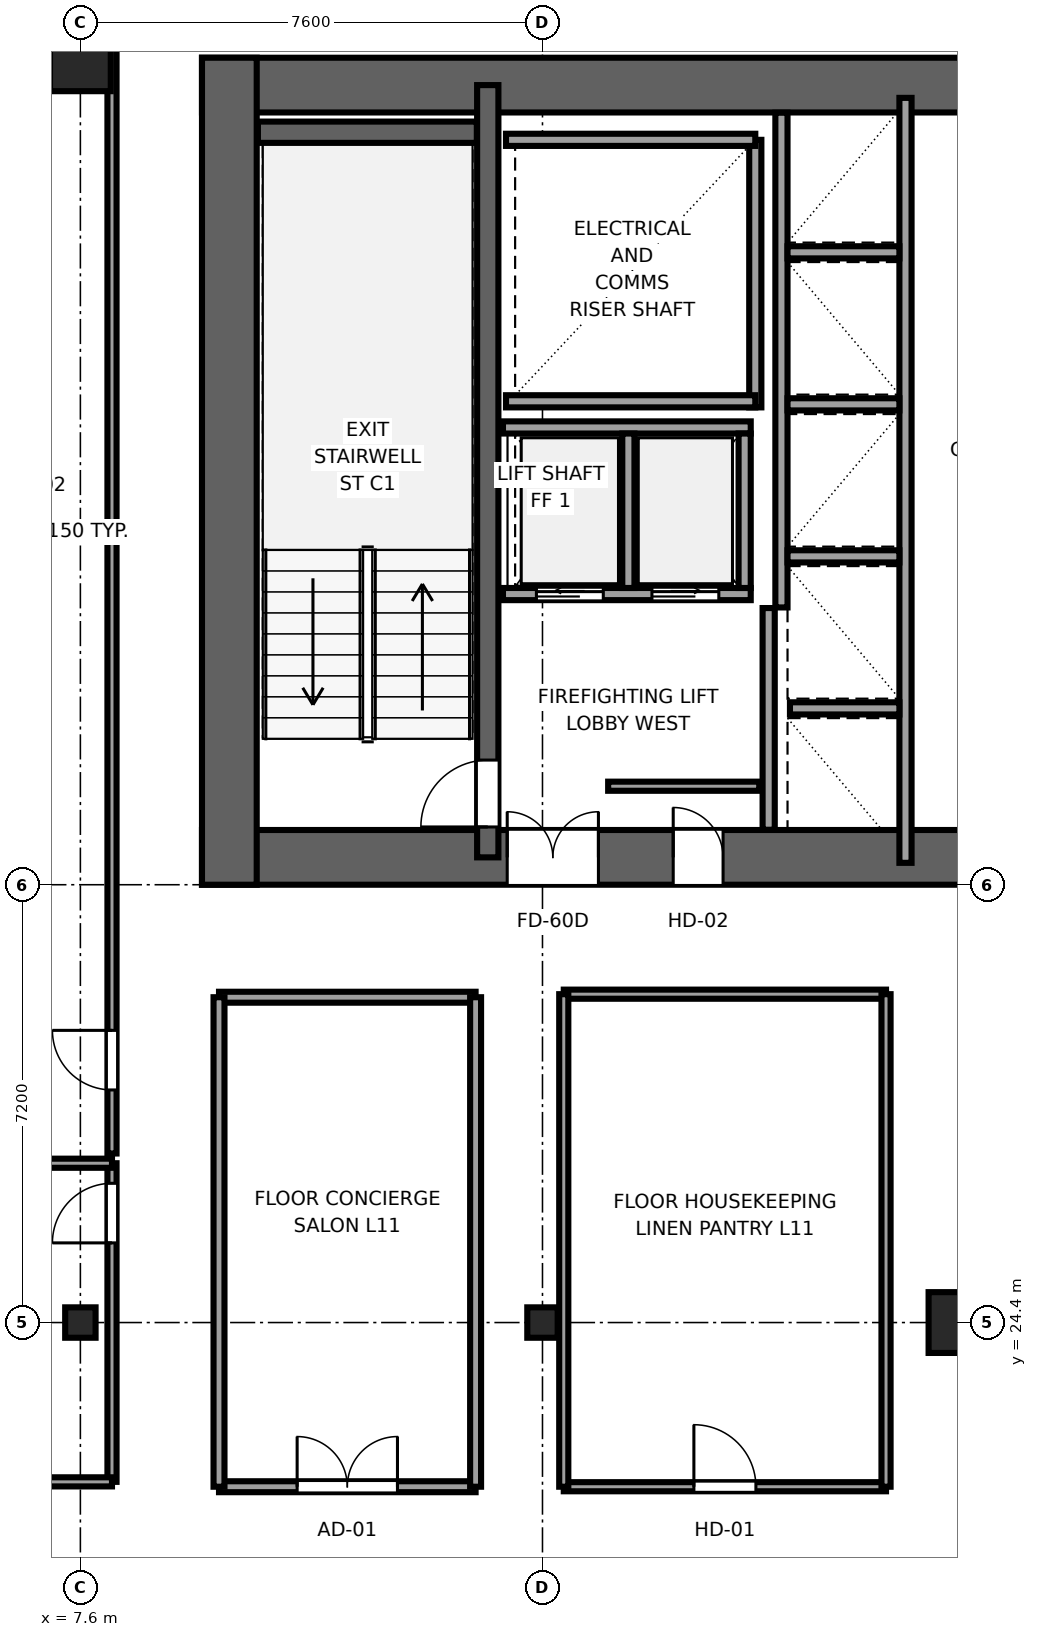
"""IFC4 building model, lengths in metres.
Left out: names, types, materials, properties, quantities, classifications, styles, units other than length and angle.
Written with IfcOpenShell. Run it as: python <this file> out.ifc"""

import sys

from ifc_helpers import new_model, si_unit, direction, frame, frame_2d, origin, origin_2d, place, context, subcontext, project, spatial, rectangle, i_section, extrude, source, transform, mapped, element, fill, save


model = new_model("IFC4")
c1 = context("Model", 3, precision=1e-05, world=origin(), true_north=direction((0.0, 1.0)))
c2 = subcontext(c1, "Body", "Model", "MODEL_VIEW")
j1 = project(units=[si_unit("LENGTHUNIT", "METRE"), si_unit("PLANEANGLEUNIT", "RADIAN")], contexts=[c1])
p1 = place(None, origin())
s1 = spatial("IfcSite", under=j1, at=p1, CompositionType="ELEMENT")
p2 = place(p1, origin())
s2 = spatial("IfcBuilding", under=s1, at=p2, CompositionType="ELEMENT")
p3 = place(p2, frame((0.0, 0.0, 49.75)))
s3 = spatial("IfcBuildingStorey", under=s2, at=p3, CompositionType="ELEMENT", Elevation=49.75)
p4 = place(p3, frame((9.6, 32.05, 0.0), z_axis=(0.0, 0.0, 1.0), x_axis=(1.0, 0.0, 0.0)))
e1 = element("IfcWall", 1, at=p4, inside=s3, PredefinedType="SHEAR", context=c2, shape_type="SweptSolid", body=[
    extrude(rectangle(XDim=26.8, YDim=0.9, at=frame_2d((13.4, 0.0))), origin(), (0.0, 0.0, 1.0), 3.55),
])
p5 = place(p4, frame((6.52, 0.0, 0.0), z_axis=(0.0, 0.0, 1.0), x_axis=(-1.0, 0.0, 0.0)))
e2 = element("IfcOpeningElement", 2, at=p5, cuts=e1, PredefinedType="OPENING", context=c2, shape_type="SweptSolid", body=[
    extrude(rectangle(XDim=1.5, YDim=2.04, at=frame_2d((0.75, 1.02))), frame((0.0, 0.46, 0.0), z_axis=(0.0, -1.0, 0.0), x_axis=(1.0, 0.0, 0.0)), (0.0, 0.0, 1.0), 0.92),
])
p6 = place(p4, frame((14.15, 0.0, 0.0), z_axis=(0.0, 0.0, 1.0), x_axis=(-1.0, 0.0, 0.0)))
e3 = element("IfcOpeningElement", 3, at=p6, cuts=e1, PredefinedType="OPENING", context=c2, shape_type="SweptSolid", body=[
    extrude(rectangle(XDim=1.5, YDim=2.04, at=frame_2d((0.75, 1.02))), frame((0.0, 0.46, 0.0), z_axis=(0.0, -1.0, 0.0), x_axis=(1.0, 0.0, 0.0)), (0.0, 0.0, 1.0), 0.92),
])
p7 = place(p4, frame((21.78, 0.0, 0.0), z_axis=(0.0, 0.0, 1.0), x_axis=(-1.0, 0.0, 0.0)))
e4 = element("IfcOpeningElement", 4, at=p7, cuts=e1, PredefinedType="OPENING", context=c2, shape_type="SweptSolid", body=[
    extrude(rectangle(XDim=1.5, YDim=2.04, at=frame_2d((0.75, 1.02))), frame((0.0, 0.46, 0.0), z_axis=(0.0, -1.0, 0.0), x_axis=(1.0, 0.0, 0.0)), (0.0, 0.0, 1.0), 0.92),
])
p8 = place(p4, frame((8.57, 0.0, 0.0), z_axis=(0.0, 0.0, 1.0), x_axis=(-1.0, 0.0, 0.0)))
e5 = element("IfcOpeningElement", 5, at=p8, cuts=e1, PredefinedType="OPENING", context=c2, shape_type="SweptSolid", body=[
    extrude(rectangle(XDim=0.82, YDim=2.01, at=frame_2d((0.41, 1.005))), frame((0.0, 0.46, 0.0), z_axis=(0.0, -1.0, 0.0), x_axis=(1.0, 0.0, 0.0)), (0.0, 0.0, 1.0), 0.92),
])
p9 = place(p4, frame((19.07, 0.0, 0.0), z_axis=(0.0, 0.0, 1.0), x_axis=(-1.0, 0.0, 0.0)))
e6 = element("IfcOpeningElement", 6, at=p9, cuts=e1, PredefinedType="OPENING", context=c2, shape_type="SweptSolid", body=[
    extrude(rectangle(XDim=0.82, YDim=2.01, at=frame_2d((0.41, 1.005))), frame((0.0, 0.46, 0.0), z_axis=(0.0, -1.0, 0.0), x_axis=(1.0, 0.0, 0.0)), (0.0, 0.0, 1.0), 0.92),
])
p10 = place(p3, frame((9.6, 44.75, 0.0), z_axis=(0.0, 0.0, 1.0), x_axis=(1.0, 0.0, 0.0)))
e7 = element("IfcWall", 7, at=p10, inside=s3, PredefinedType="SHEAR", context=c2, shape_type="SweptSolid", body=[
    extrude(rectangle(XDim=26.8, YDim=0.9, at=frame_2d((13.4, 0.0))), origin(), (0.0, 0.0, 1.0), 3.55),
])
p11 = place(p3, frame((10.05, 31.6, 0.0), z_axis=(0.0, 0.0, 1.0), x_axis=(0.0, 1.0, 0.0)))
e8 = element("IfcWall", 8, at=p11, inside=s3, PredefinedType="SHEAR", context=c2, shape_type="SweptSolid", body=[
    extrude(rectangle(XDim=13.6, YDim=0.9, at=frame_2d((6.8, 0.0))), origin(), (0.0, 0.0, 1.0), 3.55),
])
p12 = place(p3, frame((14.3, 32.05, 0.0), z_axis=(0.0, 0.0, 1.0), x_axis=(0.0, 1.0, 0.0)))
e9 = element("IfcWall", 9, at=p12, inside=s3, PredefinedType="SHEAR", context=c2, shape_type="SweptSolid", body=[
    extrude(rectangle(XDim=12.7, YDim=0.35, at=frame_2d((6.35, 0.0))), origin(), (0.0, 0.0, 1.0), 3.55),
])
p13 = place(p12, frame((0.5, 0.0, 0.0)))
e10 = element("IfcOpeningElement", 10, at=p13, cuts=e9, PredefinedType="OPENING", context=c2, shape_type="SweptSolid", body=[
    extrude(rectangle(XDim=1.1, YDim=2.12, at=frame_2d((0.55, 1.06))), frame((0.0, 0.185, 0.0), z_axis=(0.0, -1.0, 0.0), x_axis=(1.0, 0.0, 0.0)), (0.0, 0.0, 1.0), 0.37),
])
p14 = place(p3, frame((10.52, 43.975, 0.0), z_axis=(0.0, 0.0, 1.0), x_axis=(1.0, 0.0, 0.0)))
e11 = element("IfcWall", 11, at=p14, inside=s3, PredefinedType="SHEAR", context=c2, shape_type="SweptSolid", body=[
    extrude(rectangle(XDim=3.6, YDim=0.35, at=frame_2d((1.8, 0.0))), origin(), (0.0, 0.0, 1.0), 3.55),
])
m1 = source(origin(), c2, "Body", "SweptSolid", [
    extrude(i_section(OverallWidth=0.5, OverallDepth=0.5, WebThickness=0.028, FlangeThickness=0.045, at=origin_2d()), origin(), (0.0, 0.0, 1.0), 3.55),
])
for number, where, z_axis, x_axis in (
    (12, (7.6, 24.4, 0.0), (0.0, 0.0, 1.0), (1.0, 0.0, 0.0)),
    (13, (15.2, 24.4, 0.0), (0.0, 0.0, 1.0), (1.0, 0.0, 0.0)),
):
    element("IfcColumn", number, at=place(p3, frame(where, z_axis=z_axis, x_axis=x_axis)), inside=s3, PredefinedType="COLUMN", context=c2, shape_type="MappedRepresentation", body=[
        mapped(m1, transform((0.0, 0.0, 0.0), x_axis=(1.0, 0.0, 0.0), y_axis=(0.0, 1.0, 0.0), z_axis=(0.0, 0.0, 1.0), scale=1.0)),
    ])
m2 = source(origin(), c2, "Body", "SweptSolid", [
    extrude(rectangle(XDim=1.0, YDim=1.0, at=origin_2d()), origin(), (0.0, 0.0, 1.0), 3.55),
])
for number, where, z_axis, x_axis in (
    (14, (22.05, 24.4, 0.0), (0.0, 0.0, 1.0), (1.0, 0.0, 0.0)),
    (15, (7.6, 45.15, 0.0), (0.0, 0.0, 1.0), (1.0, 0.0, 0.0)),
):
    element("IfcColumn", number, at=place(p3, frame(where, z_axis=z_axis, x_axis=x_axis)), inside=s3, PredefinedType="COLUMN", context=c2, shape_type="MappedRepresentation", body=[
        mapped(m2, transform((0.0, 0.0, 0.0), x_axis=(1.0, 0.0, 0.0), y_axis=(0.0, 1.0, 0.0), z_axis=(0.0, 0.0, 1.0), scale=1.0)),
    ])
p15 = place(p3, frame((18.7, 39.45, 0.0), z_axis=(0.0, 0.0, 1.0), x_axis=(0.0, 1.0, 0.0)))
e16 = element("IfcWall", 16, at=p15, inside=s3, PredefinedType="SOLIDWALL", context=c2, shape_type="SweptSolid", body=[
    extrude(rectangle(XDim=4.4, YDim=0.2, at=frame_2d((2.2, 0.0))), origin(), (0.0, 0.0, 1.0), 3.37),
])
for number, where, z_axis, x_axis in (
    (17, (14.6, 39.55, 0.0), (0.0, 0.0, 1.0), (1.0, 0.0, 0.0)),
    (18, (14.6, 43.85, 0.0), (0.0, 0.0, 1.0), (1.0, 0.0, 0.0)),
):
    element("IfcWall", number, at=place(p3, frame(where, z_axis=z_axis, x_axis=x_axis)), inside=s3, PredefinedType="SOLIDWALL", context=c2, shape_type="SweptSolid", body=[
        extrude(rectangle(XDim=4.1, YDim=0.2, at=frame_2d((2.05, 0.0))), origin(), (0.0, 0.0, 1.0), 3.37),
    ])
p16 = place(p3, frame((18.92, 32.504, 0.0), z_axis=(0.0, 0.0, 1.0), x_axis=(0.0, 1.0, 0.0)))
e19 = element("IfcWall", 19, at=p16, inside=s3, PredefinedType="SOLIDWALL", context=c2, shape_type="SweptSolid", body=[
    extrude(rectangle(XDim=3.646, YDim=0.2, at=frame_2d((1.823, 0.0))), origin(), (0.0, 0.0, 1.0), 3.37),
])
p17 = place(p3, frame((21.17, 31.96, 0.0), z_axis=(0.0, 0.0, 1.0), x_axis=(0.0, 1.0, 0.0)))
e20 = element("IfcWall", 20, at=p17, inside=s3, PredefinedType="SOLIDWALL", context=c2, shape_type="SweptSolid", body=[
    extrude(rectangle(XDim=12.58, YDim=0.2, at=frame_2d((6.29, 0.0))), origin(), (0.0, 0.0, 1.0), 3.37),
])
p18 = place(p3, frame((19.13, 36.16, 0.0), z_axis=(0.0, 0.0, 1.0), x_axis=(0.0, 1.0, 0.0)))
e21 = element("IfcWall", 21, at=p18, inside=s3, PredefinedType="SOLIDWALL", context=c2, shape_type="SweptSolid", body=[
    extrude(rectangle(XDim=8.136, YDim=0.2, at=frame_2d((4.068, 0.0))), origin(), (0.0, 0.0, 1.0), 3.37),
])
p19 = place(p3, frame((19.27, 34.5, 0.0), z_axis=(0.0, 0.0, 1.0), x_axis=(1.0, 0.0, 0.0)))
e22 = element("IfcWall", 22, at=p19, inside=s3, PredefinedType="SOLIDWALL", context=c2, shape_type="SweptSolid", body=[
    extrude(rectangle(XDim=1.8, YDim=0.2, at=frame_2d((0.9, 0.0))), origin(), (0.0, 0.0, 1.0), 3.37),
])
for number, where, z_axis, x_axis in (
    (23, (19.23, 37.0, 0.0), (0.0, 0.0, 1.0), (1.0, 0.0, 0.0)),
    (24, (19.23, 39.5, 0.0), (0.0, 0.0, 1.0), (1.0, 0.0, 0.0)),
    (25, (19.23, 42.0, 0.0), (0.0, 0.0, 1.0), (1.0, 0.0, 0.0)),
):
    element("IfcWall", number, at=place(p3, frame(where, z_axis=z_axis, x_axis=x_axis)), inside=s3, PredefinedType="SOLIDWALL", context=c2, shape_type="SweptSolid", body=[
        extrude(rectangle(XDim=1.84, YDim=0.2, at=frame_2d((0.92, 0.0))), origin(), (0.0, 0.0, 1.0), 3.37),
    ])
p20 = place(p3, frame((14.55, 36.38, 0.0), z_axis=(0.0, 0.0, 1.0), x_axis=(1.0, 0.0, 0.0)))
e26 = element("IfcWall", 26, at=p20, inside=s3, PredefinedType="SOLIDWALL", context=c2, shape_type="SweptSolid", body=[
    extrude(rectangle(XDim=4.075, YDim=0.2, at=frame_2d((2.038, 0.0))), origin(), (0.0, 0.0, 1.0), 3.37),
])
p21 = place(p20, frame((0.55, 0.0, 0.0)))
e27 = element("IfcOpeningElement", 27, at=p21, cuts=e26, PredefinedType="OPENING", context=c2, shape_type="SweptSolid", body=[
    extrude(rectangle(XDim=1.1, YDim=2.12, at=frame_2d((0.55, 1.06))), frame((0.0, 0.11, 0.0), z_axis=(0.0, -1.0, 0.0), x_axis=(1.0, 0.0, 0.0)), (0.0, 0.0, 1.0), 0.22),
])
p22 = place(p20, frame((2.45, 0.0, 0.0)))
e28 = element("IfcOpeningElement", 28, at=p22, cuts=e26, PredefinedType="OPENING", context=c2, shape_type="SweptSolid", body=[
    extrude(rectangle(XDim=1.1, YDim=2.12, at=frame_2d((0.55, 1.06))), frame((0.0, 0.11, 0.0), z_axis=(0.0, -1.0, 0.0), x_axis=(1.0, 0.0, 0.0)), (0.0, 0.0, 1.0), 0.22),
])
p23 = place(p3, frame((14.55, 39.12, 0.0), z_axis=(0.0, 0.0, 1.0), x_axis=(1.0, 0.0, 0.0)))
e29 = element("IfcWall", 29, at=p23, inside=s3, PredefinedType="SOLIDWALL", context=c2, shape_type="SweptSolid", body=[
    extrude(rectangle(XDim=4.075, YDim=0.2, at=frame_2d((2.038, 0.0))), origin(), (0.0, 0.0, 1.0), 3.37),
])
for number, where, z_axis, x_axis in (
    (30, (18.525, 36.48, 0.0), (0.0, 0.0, 1.0), (0.0, 1.0, 0.0)),
    (31, (16.613, 36.48, 0.0), (0.0, 0.0, 1.0), (0.0, 1.0, 0.0)),
):
    element("IfcWall", number, at=place(p3, frame(where, z_axis=z_axis, x_axis=x_axis)), inside=s3, PredefinedType="SOLIDWALL", context=c2, shape_type="SweptSolid", body=[
        extrude(rectangle(XDim=2.54, YDim=0.2, at=frame_2d((1.27, 0.0))), origin(), (0.0, 0.0, 1.0), 3.37),
    ])
p24 = place(p3, frame((16.28, 33.22, 0.0), z_axis=(0.0, 0.0, 1.0), x_axis=(1.0, 0.0, 0.0)))
e32 = element("IfcWall", 32, at=p24, inside=s3, PredefinedType="PARTITIONING", context=c2, shape_type="SweptSolid", body=[
    extrude(rectangle(XDim=2.485, YDim=0.15, at=frame_2d((1.242, 0.0))), origin(), (0.0, 0.0, 1.0), 3.37),
])
p25 = place(p3, frame((8.12, 21.78, 0.0), z_axis=(0.0, 0.0, 1.0), x_axis=(0.0, 1.0, 0.0)))
e33 = element("IfcWall", 33, at=p25, inside=s3, PredefinedType="PARTITIONING", context=c2, shape_type="SweptSolid", body=[
    extrude(rectangle(XDim=5.24, YDim=0.15, at=frame_2d((2.62, 0.0))), origin(), (0.0, 0.0, 1.0), 3.37),
])
p26 = place(p25, frame((3.93, 0.0, 0.0)))
e34 = element("IfcOpeningElement", 34, at=p26, cuts=e33, PredefinedType="OPENING", context=c2, shape_type="SweptSolid", body=[
    extrude(rectangle(XDim=0.98, YDim=2.12, at=frame_2d((0.49, 1.06))), frame((0.0, 0.085, 0.0), z_axis=(0.0, -1.0, 0.0), x_axis=(1.0, 0.0, 0.0)), (0.0, 0.0, 1.0), 0.17),
])
p27 = place(p3, frame((0.405, 21.78, 0.0), z_axis=(0.0, 0.0, 1.0), x_axis=(1.0, 0.0, 0.0)))
e35 = element("IfcWall", 35, at=p27, inside=s3, PredefinedType="PARTITIONING", context=c2, shape_type="SweptSolid", body=[
    extrude(rectangle(XDim=7.715, YDim=0.15, at=frame_2d((3.857, 0.0))), origin(), (0.0, 0.0, 1.0), 3.37),
])
p28 = place(p3, frame((2.77, 27.02, 0.0), z_axis=(0.0, 0.0, 1.0), x_axis=(1.0, 0.0, 0.0)))
e36 = element("IfcWall", 36, at=p28, inside=s3, PredefinedType="PARTITIONING", context=c2, shape_type="SweptSolid", body=[
    extrude(rectangle(XDim=5.35, YDim=0.15, at=frame_2d((2.675, 0.0))), origin(), (0.0, 0.0, 1.0), 3.37),
])
p29 = place(p3, frame((8.12, 27.18, 0.0), z_axis=(0.0, 0.0, 1.0), x_axis=(0.0, 1.0, 0.0)))
e37 = element("IfcWall", 37, at=p29, inside=s3, PredefinedType="PARTITIONING", context=c2, shape_type="SweptSolid", body=[
    extrude(rectangle(XDim=18.415, YDim=0.15, at=frame_2d((9.208, 0.0))), origin(), (0.0, 0.0, 1.0), 3.37),
])
p30 = place(p29, frame((1.045, 0.0, 0.0)))
e38 = element("IfcOpeningElement", 38, at=p30, cuts=e37, PredefinedType="OPENING", context=c2, shape_type="SweptSolid", body=[
    extrude(rectangle(XDim=0.98, YDim=2.12, at=frame_2d((0.49, 1.06))), frame((0.0, 0.085, 0.0), z_axis=(0.0, -1.0, 0.0), x_axis=(1.0, 0.0, 0.0)), (0.0, 0.0, 1.0), 0.17),
])
p31 = place(p3, frame((9.88, 21.7, 0.0), z_axis=(0.0, 0.0, 1.0), x_axis=(1.0, 0.0, 0.0)))
e39 = element("IfcWall", 39, at=p31, inside=s3, PredefinedType="PARTITIONING", context=c2, shape_type="SweptSolid", body=[
    extrude(rectangle(XDim=4.22, YDim=0.18, at=frame_2d((2.11, 0.0))), origin(), (0.0, 0.0, 1.0), 3.37),
])
p32 = place(p31, frame((1.285, 0.0, 0.0)))
e40 = element("IfcOpeningElement", 40, at=p32, cuts=e39, PredefinedType="OPENING", context=c2, shape_type="SweptSolid", body=[
    extrude(rectangle(XDim=1.65, YDim=2.15, at=frame_2d((0.825, 1.075))), frame((0.0, 0.1, 0.0), z_axis=(0.0, -1.0, 0.0), x_axis=(1.0, 0.0, 0.0)), (0.0, 0.0, 1.0), 0.2),
])
p33 = place(p3, frame((9.88, 29.75, 0.0), z_axis=(0.0, 0.0, 1.0), x_axis=(1.0, 0.0, 0.0)))
e41 = element("IfcWall", 41, at=p33, inside=s3, PredefinedType="PARTITIONING", context=c2, shape_type="SweptSolid", body=[
    extrude(rectangle(XDim=4.22, YDim=0.18, at=frame_2d((2.11, 0.0))), origin(), (0.0, 0.0, 1.0), 3.37),
])
for number, where, z_axis, x_axis in (
    (42, (9.88, 21.7, 0.0), (0.0, 0.0, 1.0), (0.0, 1.0, 0.0)),
    (43, (14.1, 21.7, 0.0), (0.0, 0.0, 1.0), (0.0, 1.0, 0.0)),
):
    element("IfcWall", number, at=place(p3, frame(where, z_axis=z_axis, x_axis=x_axis)), inside=s3, PredefinedType="PARTITIONING", context=c2, shape_type="SweptSolid", body=[
        extrude(rectangle(XDim=8.05, YDim=0.18, at=frame_2d((4.025, 0.0))), origin(), (0.0, 0.0, 1.0), 3.37),
    ])
p34 = place(p3, frame((15.55, 21.7, 0.0), z_axis=(0.0, 0.0, 1.0), x_axis=(1.0, 0.0, 0.0)))
e44 = element("IfcWall", 44, at=p34, inside=s3, PredefinedType="PARTITIONING", context=c2, shape_type="SweptSolid", body=[
    extrude(rectangle(XDim=5.3, YDim=0.15, at=frame_2d((2.65, 0.0))), origin(), (0.0, 0.0, 1.0), 3.37),
])
p35 = place(p34, frame((2.14, 0.0, 0.0)))
e45 = element("IfcOpeningElement", 45, at=p35, cuts=e44, PredefinedType="OPENING", context=c2, shape_type="SweptSolid", body=[
    extrude(rectangle(XDim=1.02, YDim=2.03, at=frame_2d((0.51, 1.015))), frame((0.0, 0.085, 0.0), z_axis=(0.0, -1.0, 0.0), x_axis=(1.0, 0.0, 0.0)), (0.0, 0.0, 1.0), 0.17),
])
p36 = place(p3, frame((15.55, 29.8, 0.0), z_axis=(0.0, 0.0, 1.0), x_axis=(1.0, 0.0, 0.0)))
e46 = element("IfcWall", 46, at=p36, inside=s3, PredefinedType="PARTITIONING", context=c2, shape_type="SweptSolid", body=[
    extrude(rectangle(XDim=5.3, YDim=0.15, at=frame_2d((2.65, 0.0))), origin(), (0.0, 0.0, 1.0), 3.37),
])
for number, where, z_axis, x_axis in (
    (47, (15.55, 21.7, 0.0), (0.0, 0.0, 1.0), (0.0, 1.0, 0.0)),
    (48, (20.85, 21.7, 0.0), (0.0, 0.0, 1.0), (0.0, 1.0, 0.0)),
):
    element("IfcWall", number, at=place(p3, frame(where, z_axis=z_axis, x_axis=x_axis)), inside=s3, PredefinedType="PARTITIONING", context=c2, shape_type="SweptSolid", body=[
        extrude(rectangle(XDim=8.1, YDim=0.15, at=frame_2d((4.05, 0.0))), origin(), (0.0, 0.0, 1.0), 3.37),
    ])
m3 = source(origin(), c2, "Body", "SweptSolid", [
    extrude(rectangle(XDim=1.1, YDim=2.12, at=frame_2d((0.55, 1.06))), frame((0.0, 0.025, 0.0), z_axis=(0.0, -1.0, 0.0), x_axis=(1.0, 0.0, 0.0)), (0.0, 0.0, 1.0), 0.05),
])
p37 = place(p13, origin())
e49 = element("IfcDoor", 49, at=p37, inside=s3, OperationType="SINGLE_SWING_LEFT", PredefinedType="DOOR", context=c2, shape_type="MappedRepresentation", body=[
    mapped(m3, transform((0.0, 0.0, 0.0), x_axis=(1.0, 0.0, 0.0), y_axis=(0.0, 1.0, 0.0), z_axis=(0.0, 0.0, 1.0), scale=1.0)),
])
fill(e10, e49)
m4 = source(origin(), c2, "Body", "SweptSolid", [
    extrude(rectangle(XDim=1.5, YDim=2.04, at=frame_2d((0.75, 1.02))), frame((0.0, 0.025, 0.0), z_axis=(0.0, -1.0, 0.0), x_axis=(1.0, 0.0, 0.0)), (0.0, 0.0, 1.0), 0.05),
])
p38 = place(p5, origin())
e50 = element("IfcDoor", 50, at=p38, inside=s3, OperationType="DOUBLE_DOOR_SINGLE_SWING", PredefinedType="DOOR", context=c2, shape_type="MappedRepresentation", body=[
    mapped(m4, transform((0.0, 0.0, 0.0), x_axis=(1.0, 0.0, 0.0), y_axis=(0.0, 1.0, 0.0), z_axis=(0.0, 0.0, 1.0), scale=1.0)),
])
fill(e2, e50)
m5 = source(origin(), c2, "Body", "SweptSolid", [
    extrude(rectangle(XDim=0.82, YDim=2.01, at=frame_2d((0.41, 1.005))), frame((0.0, 0.025, 0.0), z_axis=(0.0, -1.0, 0.0), x_axis=(1.0, 0.0, 0.0)), (0.0, 0.0, 1.0), 0.05),
])
p39 = place(p8, origin())
e51 = element("IfcDoor", 51, at=p39, inside=s3, OperationType="SINGLE_SWING_LEFT", PredefinedType="DOOR", context=c2, shape_type="MappedRepresentation", body=[
    mapped(m5, transform((0.0, 0.0, 0.0), x_axis=(1.0, 0.0, 0.0), y_axis=(0.0, 1.0, 0.0), z_axis=(0.0, 0.0, 1.0), scale=1.0)),
])
fill(e5, e51)
m6 = source(origin(), c2, "Body", "SweptSolid", [
    extrude(rectangle(XDim=1.1, YDim=2.12, at=frame_2d((0.55, 1.06))), frame((0.0, 0.025, 0.0), z_axis=(0.0, -1.0, 0.0), x_axis=(1.0, 0.0, 0.0)), (0.0, 0.0, 1.0), 0.05),
])
p40 = place(p21, origin())
e52 = element("IfcDoor", 52, at=p40, inside=s3, OperationType="SLIDING_TO_LEFT", PredefinedType="DOOR", context=c2, shape_type="MappedRepresentation", body=[
    mapped(m6, transform((0.0, 0.0, 0.0), x_axis=(1.0, 0.0, 0.0), y_axis=(0.0, 1.0, 0.0), z_axis=(0.0, 0.0, 1.0), scale=1.0)),
])
fill(e27, e52)
p41 = place(p22, origin())
e53 = element("IfcDoor", 53, at=p41, inside=s3, OperationType="SLIDING_TO_RIGHT", PredefinedType="DOOR", context=c2, shape_type="MappedRepresentation", body=[
    mapped(m6, transform((0.0, 0.0, 0.0), x_axis=(1.0, 0.0, 0.0), y_axis=(0.0, 1.0, 0.0), z_axis=(0.0, 0.0, 1.0), scale=1.0)),
])
fill(e28, e53)
m7 = source(origin(), c2, "Body", "SweptSolid", [
    extrude(rectangle(XDim=0.98, YDim=2.12, at=frame_2d((0.49, 1.06))), frame((0.0, 0.025, 0.0), z_axis=(0.0, -1.0, 0.0), x_axis=(1.0, 0.0, 0.0)), (0.0, 0.0, 1.0), 0.05),
])
p42 = place(p26, origin())
e54 = element("IfcDoor", 54, at=p42, inside=s3, OperationType="SINGLE_SWING_LEFT", PredefinedType="DOOR", context=c2, shape_type="MappedRepresentation", body=[
    mapped(m7, transform((0.0, 0.0, 0.0), x_axis=(1.0, 0.0, 0.0), y_axis=(0.0, 1.0, 0.0), z_axis=(0.0, 0.0, 1.0), scale=1.0)),
])
fill(e34, e54)
p43 = place(p30, origin())
e55 = element("IfcDoor", 55, at=p43, inside=s3, OperationType="SINGLE_SWING_RIGHT", PredefinedType="DOOR", context=c2, shape_type="MappedRepresentation", body=[
    mapped(m7, transform((0.0, 0.0, 0.0), x_axis=(1.0, 0.0, 0.0), y_axis=(0.0, 1.0, 0.0), z_axis=(0.0, 0.0, 1.0), scale=1.0)),
])
fill(e38, e55)
m8 = source(origin(), c2, "Body", "SweptSolid", [
    extrude(rectangle(XDim=1.65, YDim=2.15, at=frame_2d((0.825, 1.075))), frame((0.0, 0.025, 0.0), z_axis=(0.0, -1.0, 0.0), x_axis=(1.0, 0.0, 0.0)), (0.0, 0.0, 1.0), 0.05),
])
p44 = place(p32, origin())
e56 = element("IfcDoor", 56, at=p44, inside=s3, OperationType="DOUBLE_DOOR_SINGLE_SWING", PredefinedType="DOOR", context=c2, shape_type="MappedRepresentation", body=[
    mapped(m8, transform((0.0, 0.0, 0.0), x_axis=(1.0, 0.0, 0.0), y_axis=(0.0, 1.0, 0.0), z_axis=(0.0, 0.0, 1.0), scale=1.0)),
])
fill(e40, e56)
m9 = source(origin(), c2, "Body", "SweptSolid", [
    extrude(rectangle(XDim=1.02, YDim=2.03, at=frame_2d((0.51, 1.015))), frame((0.0, 0.025, 0.0), z_axis=(0.0, -1.0, 0.0), x_axis=(1.0, 0.0, 0.0)), (0.0, 0.0, 1.0), 0.05),
])
p45 = place(p35, origin())
e57 = element("IfcDoor", 57, at=p45, inside=s3, OperationType="SINGLE_SWING_LEFT", PredefinedType="DOOR", context=c2, shape_type="MappedRepresentation", body=[
    mapped(m9, transform((0.0, 0.0, 0.0), x_axis=(1.0, 0.0, 0.0), y_axis=(0.0, 1.0, 0.0), z_axis=(0.0, 0.0, 1.0), scale=1.0)),
])
fill(e45, e57)
save(model, sys.argv[1])
